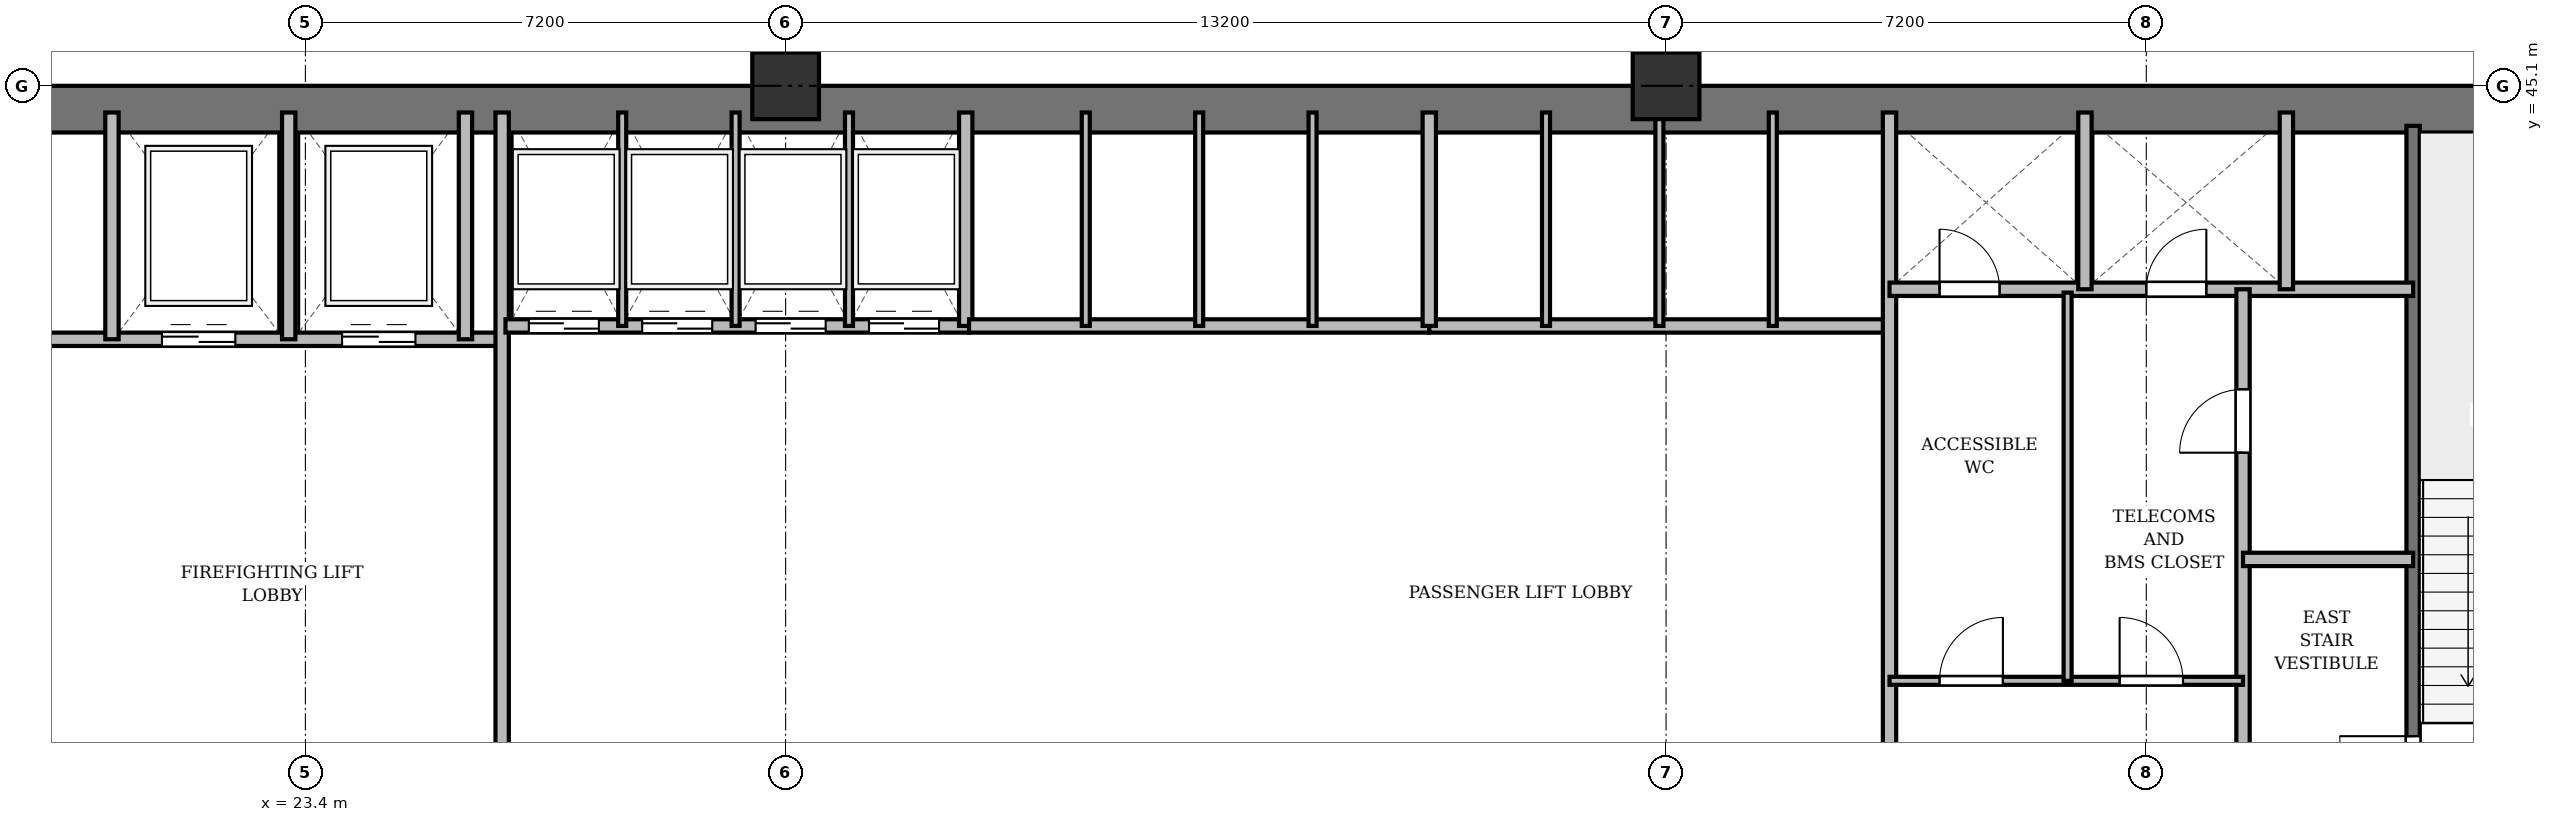
"""IFC4 building model, lengths in metres.
Left out: names, types, materials, properties, quantities, classifications, styles, units other than length and angle.
Written with IfcOpenShell. Run it as: python <this file> out.ifc"""

import sys

from ifc_helpers import new_model, si_unit, direction, frame, frame_2d, origin, origin_2d, place, context, subcontext, project, spatial, rectangle, extrude, source, transform, mapped, element, fill, save


model = new_model("IFC4")
c1 = context("Model", 3, precision=1e-05, world=origin(), true_north=direction((0.0, 1.0)))
c2 = subcontext(c1, "Body", "Model", "MODEL_VIEW")
j1 = project(units=[si_unit("LENGTHUNIT", "METRE"), si_unit("PLANEANGLEUNIT", "RADIAN")], contexts=[c1])
p1 = place(None, origin())
s1 = spatial("IfcSite", under=j1, at=p1, CompositionType="ELEMENT")
p2 = place(p1, origin())
s2 = spatial("IfcBuilding", under=s1, at=p2, CompositionType="ELEMENT")
p3 = place(p2, frame((0.0, 0.0, 18.7)))
s3 = spatial("IfcBuildingStorey", under=s2, at=p3, CompositionType="ELEMENT", Elevation=18.7)
m1 = source(origin(), c2, "Body", "SweptSolid", [
    extrude(rectangle(XDim=1.0, YDim=1.0, at=origin_2d()), origin(), (0.0, 0.0, 1.0), 4.8),
])
for number, where, z_axis, x_axis in (
    (1, (30.6, 45.1, 0.0), (0.0, 0.0, 1.0), (1.0, 0.0, 0.0)),
    (2, (43.8, 45.1, 0.0), (0.0, 0.0, 1.0), (1.0, 0.0, 0.0)),
):
    element("IfcColumn", number, at=place(p3, frame(where, z_axis=z_axis, x_axis=x_axis)), inside=s3, PredefinedType="COLUMN", context=c2, shape_type="MappedRepresentation", body=[
        mapped(m1, transform((0.0, 0.0, 0.0), x_axis=(1.0, 0.0, 0.0), y_axis=(0.0, 1.0, 0.0), z_axis=(0.0, 0.0, 1.0), scale=1.0)),
    ])
p4 = place(p3, frame((15.5, 44.75, 0.0), z_axis=(0.0, 0.0, 1.0), x_axis=(1.0, 0.0, 0.0)))
e3 = element("IfcWall", 3, at=p4, inside=s3, PredefinedType="SHEAR", context=c2, shape_type="SweptSolid", body=[
    extrude(rectangle(XDim=43.4, YDim=0.7, at=frame_2d((21.7, 0.0))), origin(), (0.0, 0.0, 1.0), 4.42),
])
p5 = place(p3, frame((55.0, 33.4, 0.0), z_axis=(0.0, 0.0, 1.0), x_axis=(0.0, 1.0, 0.0)))
e4 = element("IfcWall", 4, at=p5, inside=s3, PredefinedType="SHEAR", context=c2, shape_type="SweptSolid", body=[
    extrude(rectangle(XDim=11.1, YDim=0.2, at=frame_2d((5.55, 0.0))), origin(), (0.0, 0.0, 1.0), 4.42),
])
p6 = place(p5, frame((0.85, 0.0, 0.0)))
e5 = element("IfcOpeningElement", 5, at=p6, cuts=e4, PredefinedType="OPENING", context=c2, shape_type="SweptSolid", body=[
    extrude(rectangle(XDim=1.1, YDim=2.15, at=frame_2d((0.55, 1.075))), frame((0.0, 0.11, 0.0), z_axis=(0.0, -1.0, 0.0), x_axis=(1.0, 0.0, 0.0)), (0.0, 0.0, 1.0), 0.22),
])
p7 = place(p3, frame((19.55, 41.3, 0.0), z_axis=(0.0, 0.0, 1.0), x_axis=(1.0, 0.0, 0.0)))
e6 = element("IfcWall", 6, at=p7, inside=s3, PredefinedType="SOLIDWALL", context=c2, shape_type="SweptSolid", body=[
    extrude(rectangle(XDim=6.75, YDim=0.2, at=frame_2d((3.375, 0.0))), origin(), (0.0, 0.0, 1.0), 4.42),
])
p8 = place(p7, frame((1.7, 0.0, 0.0)))
e7 = element("IfcOpeningElement", 7, at=p8, cuts=e6, PredefinedType="OPENING", context=c2, shape_type="SweptSolid", body=[
    extrude(rectangle(XDim=1.1, YDim=2.15, at=frame_2d((0.55, 1.075))), frame((0.0, 0.11, 0.0), z_axis=(0.0, -1.0, 0.0), x_axis=(1.0, 0.0, 0.0)), (0.0, 0.0, 1.0), 0.22),
])
p9 = place(p7, frame((4.4, 0.0, 0.0)))
e8 = element("IfcOpeningElement", 8, at=p9, cuts=e6, PredefinedType="OPENING", context=c2, shape_type="SweptSolid", body=[
    extrude(rectangle(XDim=1.1, YDim=2.15, at=frame_2d((0.55, 1.075))), frame((0.0, 0.11, 0.0), z_axis=(0.0, -1.0, 0.0), x_axis=(1.0, 0.0, 0.0)), (0.0, 0.0, 1.0), 0.22),
])
for number, where, z_axis, x_axis in (
    (9, (20.5, 41.3, 0.0), (0.0, 0.0, 1.0), (0.0, 1.0, 0.0)),
    (10, (23.15, 41.3, 0.0), (0.0, 0.0, 1.0), (0.0, 1.0, 0.0)),
    (11, (25.8, 41.3, 0.0), (0.0, 0.0, 1.0), (0.0, 1.0, 0.0)),
):
    element("IfcWall", number, at=place(p3, frame(where, z_axis=z_axis, x_axis=x_axis)), inside=s3, PredefinedType="SOLIDWALL", context=c2, shape_type="SweptSolid", body=[
        extrude(rectangle(XDim=3.4, YDim=0.2, at=frame_2d((1.7, 0.0))), origin(), (0.0, 0.0, 1.0), 4.42),
    ])
p10 = place(p3, frame((26.35, 33.4, 0.0), z_axis=(0.0, 0.0, 1.0), x_axis=(0.0, 1.0, 0.0)))
e12 = element("IfcWall", 12, at=p10, inside=s3, PredefinedType="SOLIDWALL", context=c2, shape_type="SweptSolid", body=[
    extrude(rectangle(XDim=11.3, YDim=0.2, at=frame_2d((5.65, 0.0))), origin(), (0.0, 0.0, 1.0), 2.62),
])
p11 = place(p3, frame((26.4, 41.5, 0.0), z_axis=(0.0, 0.0, 1.0), x_axis=(1.0, 0.0, 0.0)))
e13 = element("IfcWall", 13, at=p11, inside=s3, PredefinedType="SOLIDWALL", context=c2, shape_type="SweptSolid", body=[
    extrude(rectangle(XDim=6.95, YDim=0.2, at=frame_2d((3.475, 0.0))), origin(), (0.0, 0.0, 1.0), 4.42),
])
p12 = place(p11, frame((0.35, 0.0, 0.0)))
e14 = element("IfcOpeningElement", 14, at=p12, cuts=e13, PredefinedType="OPENING", context=c2, shape_type="SweptSolid", body=[
    extrude(rectangle(XDim=1.05, YDim=2.15, at=frame_2d((0.525, 1.075))), frame((0.0, 0.11, 0.0), z_axis=(0.0, -1.0, 0.0), x_axis=(1.0, 0.0, 0.0)), (0.0, 0.0, 1.0), 0.22),
])
p13 = place(p11, frame((2.05, 0.0, 0.0)))
e15 = element("IfcOpeningElement", 15, at=p13, cuts=e13, PredefinedType="OPENING", context=c2, shape_type="SweptSolid", body=[
    extrude(rectangle(XDim=1.05, YDim=2.15, at=frame_2d((0.525, 1.075))), frame((0.0, 0.11, 0.0), z_axis=(0.0, -1.0, 0.0), x_axis=(1.0, 0.0, 0.0)), (0.0, 0.0, 1.0), 0.22),
])
p14 = place(p11, frame((3.75, 0.0, 0.0)))
e16 = element("IfcOpeningElement", 16, at=p14, cuts=e13, PredefinedType="OPENING", context=c2, shape_type="SweptSolid", body=[
    extrude(rectangle(XDim=1.05, YDim=2.15, at=frame_2d((0.525, 1.075))), frame((0.0, 0.11, 0.0), z_axis=(0.0, -1.0, 0.0), x_axis=(1.0, 0.0, 0.0)), (0.0, 0.0, 1.0), 0.22),
])
p15 = place(p11, frame((5.45, 0.0, 0.0)))
e17 = element("IfcOpeningElement", 17, at=p15, cuts=e13, PredefinedType="OPENING", context=c2, shape_type="SweptSolid", body=[
    extrude(rectangle(XDim=1.05, YDim=2.15, at=frame_2d((0.525, 1.075))), frame((0.0, 0.11, 0.0), z_axis=(0.0, -1.0, 0.0), x_axis=(1.0, 0.0, 0.0)), (0.0, 0.0, 1.0), 0.22),
])
p16 = place(p3, frame((33.3, 41.5, 0.0), z_axis=(0.0, 0.0, 1.0), x_axis=(0.0, 1.0, 0.0)))
e18 = element("IfcWall", 18, at=p16, inside=s3, PredefinedType="SOLIDWALL", context=c2, shape_type="SweptSolid", body=[
    extrude(rectangle(XDim=3.2, YDim=0.2, at=frame_2d((1.6, 0.0))), origin(), (0.0, 0.0, 1.0), 4.42),
])
for number, where, z_axis, x_axis in (
    (19, (28.15, 41.5, 0.0), (0.0, 0.0, 1.0), (0.0, 1.0, 0.0)),
    (20, (29.85, 41.5, 0.0), (0.0, 0.0, 1.0), (0.0, 1.0, 0.0)),
    (21, (31.55, 41.5, 0.0), (0.0, 0.0, 1.0), (0.0, 1.0, 0.0)),
):
    element("IfcWall", number, at=place(p3, frame(where, z_axis=z_axis, x_axis=x_axis)), inside=s3, PredefinedType="PARTITIONING", context=c2, shape_type="SweptSolid", body=[
        extrude(rectangle(XDim=3.2, YDim=0.12, at=frame_2d((1.6, 0.0))), origin(), (0.0, 0.0, 1.0), 4.42),
    ])
p17 = place(p3, frame((33.35, 41.5, 0.0), z_axis=(0.0, 0.0, 1.0), x_axis=(1.0, 0.0, 0.0)))
e22 = element("IfcWall", 22, at=p17, inside=s3, PredefinedType="SOLIDWALL", context=c2, shape_type="SweptSolid", body=[
    extrude(rectangle(XDim=6.9, YDim=0.2, at=frame_2d((3.45, 0.0))), origin(), (0.0, 0.0, 1.0), 4.42),
])
for number, where, z_axis, x_axis in (
    (23, (35.1, 41.5, 0.0), (0.0, 0.0, 1.0), (0.0, 1.0, 0.0)),
    (24, (36.8, 41.5, 0.0), (0.0, 0.0, 1.0), (0.0, 1.0, 0.0)),
    (25, (38.5, 41.5, 0.0), (0.0, 0.0, 1.0), (0.0, 1.0, 0.0)),
):
    element("IfcWall", number, at=place(p3, frame(where, z_axis=z_axis, x_axis=x_axis)), inside=s3, PredefinedType="PARTITIONING", context=c2, shape_type="SweptSolid", body=[
        extrude(rectangle(XDim=3.2, YDim=0.12, at=frame_2d((1.6, 0.0))), origin(), (0.0, 0.0, 1.0), 4.42),
    ])
p18 = place(p3, frame((40.25, 41.5, 0.0), z_axis=(0.0, 0.0, 1.0), x_axis=(1.0, 0.0, 0.0)))
e26 = element("IfcWall", 26, at=p18, inside=s3, PredefinedType="SOLIDWALL", context=c2, shape_type="SweptSolid", body=[
    extrude(rectangle(XDim=6.9, YDim=0.2, at=frame_2d((3.45, 0.0))), origin(), (0.0, 0.0, 1.0), 2.92),
])
p19 = place(p3, frame((40.25, 41.5, 0.0), z_axis=(0.0, 0.0, 1.0), x_axis=(0.0, 1.0, 0.0)))
e27 = element("IfcWall", 27, at=p19, inside=s3, PredefinedType="SOLIDWALL", context=c2, shape_type="SweptSolid", body=[
    extrude(rectangle(XDim=3.2, YDim=0.2, at=frame_2d((1.6, 0.0))), origin(), (0.0, 0.0, 1.0), 4.42),
])
p20 = place(p3, frame((42.0, 41.5, 0.0), z_axis=(0.0, 0.0, 1.0), x_axis=(0.0, 1.0, 0.0)))
e28 = element("IfcWall", 28, at=p20, inside=s3, PredefinedType="PARTITIONING", context=c2, shape_type="SweptSolid", body=[
    extrude(rectangle(XDim=3.2, YDim=0.12, at=frame_2d((1.6, 0.0))), origin(), (0.0, 0.0, 1.0), 4.42),
])
p21 = place(p3, frame((43.7, 41.5, 0.0), z_axis=(0.0, 0.0, 1.0), x_axis=(0.0, 1.0, 0.0)))
e29 = element("IfcWall", 29, at=p21, inside=s3, PredefinedType="PARTITIONING", context=c2, shape_type="SweptSolid", body=[
    extrude(rectangle(XDim=3.2, YDim=0.12, at=frame_2d((1.6, 0.0))), origin(), (0.0, 0.0, 1.0), 2.92),
])
p22 = place(p3, frame((45.4, 41.5, 0.0), z_axis=(0.0, 0.0, 1.0), x_axis=(0.0, 1.0, 0.0)))
e30 = element("IfcWall", 30, at=p22, inside=s3, PredefinedType="PARTITIONING", context=c2, shape_type="SweptSolid", body=[
    extrude(rectangle(XDim=3.2, YDim=0.12, at=frame_2d((1.6, 0.0))), origin(), (0.0, 0.0, 1.0), 4.42),
])
p23 = place(p3, frame((47.15, 33.4, 0.0), z_axis=(0.0, 0.0, 1.0), x_axis=(0.0, 1.0, 0.0)))
e31 = element("IfcWall", 31, at=p23, inside=s3, PredefinedType="SOLIDWALL", context=c2, shape_type="SweptSolid", body=[
    extrude(rectangle(XDim=11.3, YDim=0.2, at=frame_2d((5.65, 0.0))), origin(), (0.0, 0.0, 1.0), 2.62),
])
p24 = place(p3, frame((47.15, 42.05, 0.0), z_axis=(0.0, 0.0, 1.0), x_axis=(1.0, 0.0, 0.0)))
e32 = element("IfcWall", 32, at=p24, inside=s3, PredefinedType="SOLIDWALL", context=c2, shape_type="SweptSolid", body=[
    extrude(rectangle(XDim=7.85, YDim=0.2, at=frame_2d((3.925, 0.0))), origin(), (0.0, 0.0, 1.0), 4.42),
])
p25 = place(p24, frame((0.75, 0.0, 0.0)))
e33 = element("IfcOpeningElement", 33, at=p25, cuts=e32, PredefinedType="OPENING", context=c2, shape_type="SweptSolid", body=[
    extrude(rectangle(XDim=0.9, YDim=2.1, at=frame_2d((0.45, 1.05))), frame((0.0, 0.11, 0.0), z_axis=(0.0, -1.0, 0.0), x_axis=(1.0, 0.0, 0.0)), (0.0, 0.0, 1.0), 0.22),
])
p26 = place(p24, frame((3.85, 0.0, 0.0)))
e34 = element("IfcOpeningElement", 34, at=p26, cuts=e32, PredefinedType="OPENING", context=c2, shape_type="SweptSolid", body=[
    extrude(rectangle(XDim=0.9, YDim=2.1, at=frame_2d((0.45, 1.05))), frame((0.0, 0.11, 0.0), z_axis=(0.0, -1.0, 0.0), x_axis=(1.0, 0.0, 0.0)), (0.0, 0.0, 1.0), 0.22),
])
for number, where, z_axis, x_axis in (
    (35, (50.08, 42.05, 0.0), (0.0, 0.0, 1.0), (0.0, 1.0, 0.0)),
    (36, (53.1, 42.05, 0.0), (0.0, 0.0, 1.0), (0.0, 1.0, 0.0)),
):
    element("IfcWall", number, at=place(p3, frame(where, z_axis=z_axis, x_axis=x_axis)), inside=s3, PredefinedType="SOLIDWALL", context=c2, shape_type="SweptSolid", body=[
        extrude(rectangle(XDim=2.65, YDim=0.2, at=frame_2d((1.325, 0.0))), origin(), (0.0, 0.0, 1.0), 4.42),
    ])
p27 = place(p3, frame((52.45, 33.4, 0.0), z_axis=(0.0, 0.0, 1.0), x_axis=(0.0, 1.0, 0.0)))
e37 = element("IfcWall", 37, at=p27, inside=s3, PredefinedType="PARTITIONING", context=c2, shape_type="SweptSolid", body=[
    extrude(rectangle(XDim=8.65, YDim=0.2, at=frame_2d((4.325, 0.0))), origin(), (0.0, 0.0, 1.0), 2.62),
])
p28 = place(p27, frame((6.2, 0.0, 0.0)))
e38 = element("IfcOpeningElement", 38, at=p28, cuts=e37, PredefinedType="OPENING", context=c2, shape_type="SweptSolid", body=[
    extrude(rectangle(XDim=0.95, YDim=2.15, at=frame_2d((0.475, 1.075))), frame((0.0, 0.11, 0.0), z_axis=(0.0, -1.0, 0.0), x_axis=(1.0, 0.0, 0.0)), (0.0, 0.0, 1.0), 0.22),
])
p29 = place(p3, frame((52.45, 38.0, 0.0), z_axis=(0.0, 0.0, 1.0), x_axis=(1.0, 0.0, 0.0)))
e39 = element("IfcWall", 39, at=p29, inside=s3, PredefinedType="PARTITIONING", context=c2, shape_type="SweptSolid", body=[
    extrude(rectangle(XDim=2.55, YDim=0.2, at=frame_2d((1.275, 0.0))), origin(), (0.0, 0.0, 1.0), 4.42),
])
p30 = place(p3, frame((47.15, 36.18, 0.0), z_axis=(0.0, 0.0, 1.0), x_axis=(1.0, 0.0, 0.0)))
e40 = element("IfcWall", 40, at=p30, inside=s3, PredefinedType="PARTITIONING", context=c2, shape_type="SweptSolid", body=[
    extrude(rectangle(XDim=5.3, YDim=0.12, at=frame_2d((2.65, 0.0))), origin(), (0.0, 0.0, 1.0), 4.42),
])
p31 = place(p30, frame((0.75, 0.0, 0.0)))
e41 = element("IfcOpeningElement", 41, at=p31, cuts=e40, PredefinedType="OPENING", context=c2, shape_type="SweptSolid", body=[
    extrude(rectangle(XDim=0.95, YDim=2.15, at=frame_2d((0.475, 1.075))), frame((0.0, 0.07, 0.0), z_axis=(0.0, -1.0, 0.0), x_axis=(1.0, 0.0, 0.0)), (0.0, 0.0, 1.0), 0.14),
])
p32 = place(p30, frame((3.45, 0.0, 0.0)))
e42 = element("IfcOpeningElement", 42, at=p32, cuts=e40, PredefinedType="OPENING", context=c2, shape_type="SweptSolid", body=[
    extrude(rectangle(XDim=0.95, YDim=2.15, at=frame_2d((0.475, 1.075))), frame((0.0, 0.07, 0.0), z_axis=(0.0, -1.0, 0.0), x_axis=(1.0, 0.0, 0.0)), (0.0, 0.0, 1.0), 0.14),
])
p33 = place(p3, frame((49.82, 36.18, 0.0), z_axis=(0.0, 0.0, 1.0), x_axis=(0.0, 1.0, 0.0)))
e43 = element("IfcWall", 43, at=p33, inside=s3, PredefinedType="PARTITIONING", context=c2, shape_type="SweptSolid", body=[
    extrude(rectangle(XDim=5.82, YDim=0.12, at=frame_2d((2.91, 0.0))), origin(), (0.0, 0.0, 1.0), 4.42),
])
m2 = source(origin(), c2, "Body", "SweptSolid", [
    extrude(rectangle(XDim=1.1, YDim=2.15, at=frame_2d((0.55, 1.075))), frame((0.0, 0.025, 0.0), z_axis=(0.0, -1.0, 0.0), x_axis=(1.0, 0.0, 0.0)), (0.0, 0.0, 1.0), 0.05),
])
p34 = place(p6, origin())
e44 = element("IfcDoor", 44, at=p34, inside=s3, OperationType="SINGLE_SWING_RIGHT", PredefinedType="DOOR", context=c2, shape_type="MappedRepresentation", body=[
    mapped(m2, transform((0.0, 0.0, 0.0), x_axis=(1.0, 0.0, 0.0), y_axis=(0.0, 1.0, 0.0), z_axis=(0.0, 0.0, 1.0), scale=1.0)),
])
fill(e5, e44)
p35 = place(p8, origin())
e45 = element("IfcDoor", 45, at=p35, inside=s3, OperationType="DOUBLE_DOOR_SLIDING", PredefinedType="DOOR", context=c2, shape_type="MappedRepresentation", body=[
    mapped(m2, transform((0.0, 0.0, 0.0), x_axis=(1.0, 0.0, 0.0), y_axis=(0.0, 1.0, 0.0), z_axis=(0.0, 0.0, 1.0), scale=1.0)),
])
fill(e7, e45)
p36 = place(p9, origin())
e46 = element("IfcDoor", 46, at=p36, inside=s3, OperationType="DOUBLE_DOOR_SLIDING", PredefinedType="DOOR", context=c2, shape_type="MappedRepresentation", body=[
    mapped(m2, transform((0.0, 0.0, 0.0), x_axis=(1.0, 0.0, 0.0), y_axis=(0.0, 1.0, 0.0), z_axis=(0.0, 0.0, 1.0), scale=1.0)),
])
fill(e8, e46)
m3 = source(origin(), c2, "Body", "SweptSolid", [
    extrude(rectangle(XDim=1.05, YDim=2.15, at=frame_2d((0.525, 1.075))), frame((0.0, 0.025, 0.0), z_axis=(0.0, -1.0, 0.0), x_axis=(1.0, 0.0, 0.0)), (0.0, 0.0, 1.0), 0.05),
])
p37 = place(p12, origin())
e47 = element("IfcDoor", 47, at=p37, inside=s3, OperationType="DOUBLE_DOOR_SLIDING", PredefinedType="DOOR", context=c2, shape_type="MappedRepresentation", body=[
    mapped(m3, transform((0.0, 0.0, 0.0), x_axis=(1.0, 0.0, 0.0), y_axis=(0.0, 1.0, 0.0), z_axis=(0.0, 0.0, 1.0), scale=1.0)),
])
fill(e14, e47)
p38 = place(p13, origin())
e48 = element("IfcDoor", 48, at=p38, inside=s3, OperationType="DOUBLE_DOOR_SLIDING", PredefinedType="DOOR", context=c2, shape_type="MappedRepresentation", body=[
    mapped(m3, transform((0.0, 0.0, 0.0), x_axis=(1.0, 0.0, 0.0), y_axis=(0.0, 1.0, 0.0), z_axis=(0.0, 0.0, 1.0), scale=1.0)),
])
fill(e15, e48)
p39 = place(p14, origin())
e49 = element("IfcDoor", 49, at=p39, inside=s3, OperationType="DOUBLE_DOOR_SLIDING", PredefinedType="DOOR", context=c2, shape_type="MappedRepresentation", body=[
    mapped(m3, transform((0.0, 0.0, 0.0), x_axis=(1.0, 0.0, 0.0), y_axis=(0.0, 1.0, 0.0), z_axis=(0.0, 0.0, 1.0), scale=1.0)),
])
fill(e16, e49)
p40 = place(p15, origin())
e50 = element("IfcDoor", 50, at=p40, inside=s3, OperationType="DOUBLE_DOOR_SLIDING", PredefinedType="DOOR", context=c2, shape_type="MappedRepresentation", body=[
    mapped(m3, transform((0.0, 0.0, 0.0), x_axis=(1.0, 0.0, 0.0), y_axis=(0.0, 1.0, 0.0), z_axis=(0.0, 0.0, 1.0), scale=1.0)),
])
fill(e17, e50)
m4 = source(origin(), c2, "Body", "SweptSolid", [
    extrude(rectangle(XDim=0.9, YDim=2.1, at=frame_2d((0.45, 1.05))), frame((0.0, 0.025, 0.0), z_axis=(0.0, -1.0, 0.0), x_axis=(1.0, 0.0, 0.0)), (0.0, 0.0, 1.0), 0.05),
])
p41 = place(p25, origin())
e51 = element("IfcDoor", 51, at=p41, inside=s3, OperationType="SINGLE_SWING_LEFT", PredefinedType="DOOR", context=c2, shape_type="MappedRepresentation", body=[
    mapped(m4, transform((0.0, 0.0, 0.0), x_axis=(1.0, 0.0, 0.0), y_axis=(0.0, 1.0, 0.0), z_axis=(0.0, 0.0, 1.0), scale=1.0)),
])
fill(e33, e51)
p42 = place(p26, origin())
e52 = element("IfcDoor", 52, at=p42, inside=s3, OperationType="SINGLE_SWING_RIGHT", PredefinedType="DOOR", context=c2, shape_type="MappedRepresentation", body=[
    mapped(m4, transform((0.0, 0.0, 0.0), x_axis=(1.0, 0.0, 0.0), y_axis=(0.0, 1.0, 0.0), z_axis=(0.0, 0.0, 1.0), scale=1.0)),
])
fill(e34, e52)
m5 = source(origin(), c2, "Body", "SweptSolid", [
    extrude(rectangle(XDim=0.95, YDim=2.15, at=frame_2d((0.475, 1.075))), frame((0.0, 0.025, 0.0), z_axis=(0.0, -1.0, 0.0), x_axis=(1.0, 0.0, 0.0)), (0.0, 0.0, 1.0), 0.05),
])
p43 = place(p28, origin())
e53 = element("IfcDoor", 53, at=p43, inside=s3, OperationType="SINGLE_SWING_LEFT", PredefinedType="DOOR", context=c2, shape_type="MappedRepresentation", body=[
    mapped(m5, transform((0.0, 0.0, 0.0), x_axis=(1.0, 0.0, 0.0), y_axis=(0.0, 1.0, 0.0), z_axis=(0.0, 0.0, 1.0), scale=1.0)),
])
fill(e38, e53)
p44 = place(p31, origin())
e54 = element("IfcDoor", 54, at=p44, inside=s3, OperationType="SINGLE_SWING_RIGHT", PredefinedType="DOOR", context=c2, shape_type="MappedRepresentation", body=[
    mapped(m5, transform((0.0, 0.0, 0.0), x_axis=(1.0, 0.0, 0.0), y_axis=(0.0, 1.0, 0.0), z_axis=(0.0, 0.0, 1.0), scale=1.0)),
])
fill(e41, e54)
p45 = place(p32, origin())
e55 = element("IfcDoor", 55, at=p45, inside=s3, OperationType="SINGLE_SWING_LEFT", PredefinedType="DOOR", context=c2, shape_type="MappedRepresentation", body=[
    mapped(m5, transform((0.0, 0.0, 0.0), x_axis=(1.0, 0.0, 0.0), y_axis=(0.0, 1.0, 0.0), z_axis=(0.0, 0.0, 1.0), scale=1.0)),
])
fill(e42, e55)
save(model, sys.argv[1])
